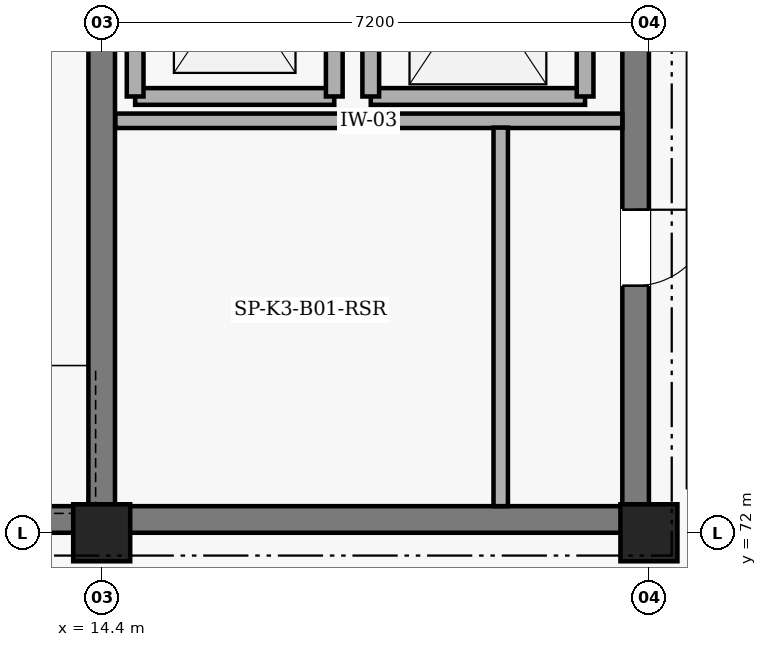
"""IFC4 building model, lengths in metres.
Left out: names, types, materials, properties, quantities, classifications, styles, units other than length and angle.
Written with IfcOpenShell. Run it as: python <this file> out.ifc"""

import sys

from ifc_helpers import new_model, si_unit, direction, frame, frame_2d, origin, origin_2d, place, context, subcontext, project, spatial, rectangle, extrude, element, fill, save


model = new_model("IFC4")
c1 = context("Model", 3, precision=1e-05, world=origin(), true_north=direction((0.0, 1.0)))
c2 = subcontext(c1, "Body", "Model", "MODEL_VIEW")
j1 = project(units=[si_unit("LENGTHUNIT", "METRE"), si_unit("PLANEANGLEUNIT", "RADIAN")], contexts=[c1])
p1 = place(None, origin())
s1 = spatial("IfcSite", under=j1, at=p1, CompositionType="ELEMENT")
p2 = place(p1, origin())
s2 = spatial("IfcBuilding", under=s1, at=p2, CompositionType="ELEMENT")
p3 = place(p2, frame((0.0, 0.0, -5.4)))
s3 = spatial("IfcBuildingStorey", under=s2, at=p3, CompositionType="ELEMENT", Elevation=-5.4)
p4 = place(p3, frame((21.425, 86.05, 0.0), z_axis=(0.0, 0.0, 1.0), x_axis=(0.0, -1.0, 0.0)))
e1 = element("IfcWall", 1, at=p4, inside=s3, PredefinedType="SHEAR", context=c2, shape_type="SweptSolid", body=[
    extrude(rectangle(XDim=13.7, YDim=0.35, at=frame_2d((6.85, 0.0))), origin(), (0.0, 0.0, 1.0), 5.4),
])
p5 = place(p4, frame((9.8, 0.0, 0.0)))
e2 = element("IfcOpeningElement", 2, at=p5, cuts=e1, PredefinedType="OPENING", context=c2, shape_type="SweptSolid", body=[
    extrude(rectangle(XDim=1.0, YDim=2.15, at=frame_2d((0.5, 1.075))), frame((0.0, 0.185, 0.0), z_axis=(0.0, -1.0, 0.0), x_axis=(1.0, 0.0, 0.0)), (0.0, 0.0, 1.0), 0.37),
])
p6 = place(p4, frame((2.3, 0.0, 0.0)))
e3 = element("IfcOpeningElement", 3, at=p6, cuts=e1, PredefinedType="OPENING", context=c2, shape_type="SweptSolid", body=[
    extrude(rectangle(XDim=1.25, YDim=2.2, at=frame_2d((0.625, 1.1))), frame((0.0, 0.185, 0.0), z_axis=(0.0, -1.0, 0.0), x_axis=(1.0, 0.0, 0.0)), (0.0, 0.0, 1.0), 0.37),
])
p7 = place(p3, frame((21.6, 72.175, 0.0), z_axis=(0.0, 0.0, 1.0), x_axis=(-1.0, 0.0, 0.0)))
e4 = element("IfcWall", 4, at=p7, inside=s3, PredefinedType="SHEAR", context=c2, shape_type="SweptSolid", body=[
    extrude(rectangle(XDim=14.4, YDim=0.35, at=frame_2d((7.2, 0.0))), origin(), (0.0, 0.0, 1.0), 5.4),
])
p8 = place(p3, frame((14.4, 86.05, 0.0), z_axis=(0.0, 0.0, 1.0), x_axis=(0.0, -1.0, 0.0)))
e5 = element("IfcWall", 5, at=p8, inside=s3, PredefinedType="SHEAR", context=c2, shape_type="SweptSolid", body=[
    extrude(rectangle(XDim=13.7, YDim=0.35, at=frame_2d((6.85, 0.0))), origin(), (0.0, 0.0, 1.0), 5.4),
])
p9 = place(p8, frame((1.5, 0.0, 0.0)))
e6 = element("IfcOpeningElement", 6, at=p9, cuts=e5, PredefinedType="OPENING", context=c2, shape_type="SweptSolid", body=[
    extrude(rectangle(XDim=1.25, YDim=2.2, at=frame_2d((0.625, 1.1))), frame((0.0, 0.185, 0.0), z_axis=(0.0, -1.0, 0.0), x_axis=(1.0, 0.0, 0.0)), (0.0, 0.0, 1.0), 0.37),
])
for number, where, z_axis, x_axis in (
    (7, (14.4, 72.0, 0.0), (0.0, 0.0, 1.0), (1.0, 0.0, 0.0)),
    (8, (21.6, 72.0, 0.0), (0.0, 0.0, 1.0), (1.0, 0.0, 0.0)),
):
    element("IfcColumn", number, at=place(p3, frame(where, z_axis=z_axis, x_axis=x_axis)), inside=s3, PredefinedType="COLUMN", context=c2, shape_type="SweptSolid", body=[
        extrude(rectangle(XDim=0.75, YDim=0.75, at=origin_2d()), origin(), (0.0, 0.0, 1.0), 5.0),
    ])
p10 = place(p3, frame((14.58, 77.42, 0.0), z_axis=(0.0, 0.0, 1.0), x_axis=(1.0, 0.0, 0.0)))
e9 = element("IfcWall", 9, at=p10, inside=s3, PredefinedType="PARTITIONING", context=c2, shape_type="SweptSolid", body=[
    extrude(rectangle(XDim=6.67, YDim=0.19, at=frame_2d((3.335, 0.0))), origin(), (0.0, 0.0, 1.0), 5.05),
])
p11 = place(p3, frame((19.65, 72.35, 0.0), z_axis=(0.0, 0.0, 1.0), x_axis=(0.0, 1.0, 0.0)))
e10 = element("IfcWall", 10, at=p11, inside=s3, PredefinedType="PARTITIONING", context=c2, shape_type="SweptSolid", body=[
    extrude(rectangle(XDim=4.98, YDim=0.19, at=frame_2d((2.49, 0.0))), origin(), (0.0, 0.0, 1.0), 5.05),
])
p12 = place(p3, frame((14.84, 77.74, 0.0), z_axis=(0.0, 0.0, 1.0), x_axis=(1.0, 0.0, 0.0)))
e11 = element("IfcWall", 11, at=p12, inside=s3, PredefinedType="PARTITIONING", context=c2, shape_type="SweptSolid", body=[
    extrude(rectangle(XDim=2.62, YDim=0.22, at=frame_2d((1.31, 0.0))), origin(), (0.0, 0.0, 1.0), 5.05),
])
for number, where, z_axis, x_axis in (
    (12, (14.84, 77.74, 0.0), (0.0, 0.0, 1.0), (0.0, 1.0, 0.0)),
    (13, (17.46, 77.74, 0.0), (0.0, 0.0, 1.0), (0.0, 1.0, 0.0)),
):
    element("IfcWall", number, at=place(p3, frame(where, z_axis=z_axis, x_axis=x_axis)), inside=s3, PredefinedType="PARTITIONING", context=c2, shape_type="SweptSolid", body=[
        extrude(rectangle(XDim=3.0, YDim=0.22, at=frame_2d((1.5, 0.0))), origin(), (0.0, 0.0, 1.0), 5.05),
    ])
p13 = place(p3, frame((17.94, 77.74, 0.0), z_axis=(0.0, 0.0, 1.0), x_axis=(1.0, 0.0, 0.0)))
e14 = element("IfcWall", 14, at=p13, inside=s3, PredefinedType="PARTITIONING", context=c2, shape_type="SweptSolid", body=[
    extrude(rectangle(XDim=2.82, YDim=0.22, at=frame_2d((1.41, 0.0))), origin(), (0.0, 0.0, 1.0), 5.05),
])
for number, where, z_axis, x_axis in (
    (15, (17.94, 77.74, 0.0), (0.0, 0.0, 1.0), (0.0, 1.0, 0.0)),
    (16, (20.76, 77.74, 0.0), (0.0, 0.0, 1.0), (0.0, 1.0, 0.0)),
):
    element("IfcWall", number, at=place(p3, frame(where, z_axis=z_axis, x_axis=x_axis)), inside=s3, PredefinedType="PARTITIONING", context=c2, shape_type="SweptSolid", body=[
        extrude(rectangle(XDim=3.0, YDim=0.22, at=frame_2d((1.5, 0.0))), origin(), (0.0, 0.0, 1.0), 5.05),
    ])
p14 = place(p5, origin())
e17 = element("IfcDoor", 17, at=p14, inside=s3, OperationType="SINGLE_SWING_LEFT", PredefinedType="DOOR", context=c2, shape_type="SweptSolid", body=[
    extrude(rectangle(XDim=1.0, YDim=2.15, at=frame_2d((0.5, 1.075))), frame((0.0, 0.025, 0.0), z_axis=(0.0, -1.0, 0.0), x_axis=(1.0, 0.0, 0.0)), (0.0, 0.0, 1.0), 0.05),
])
fill(e2, e17)
save(model, sys.argv[1])
